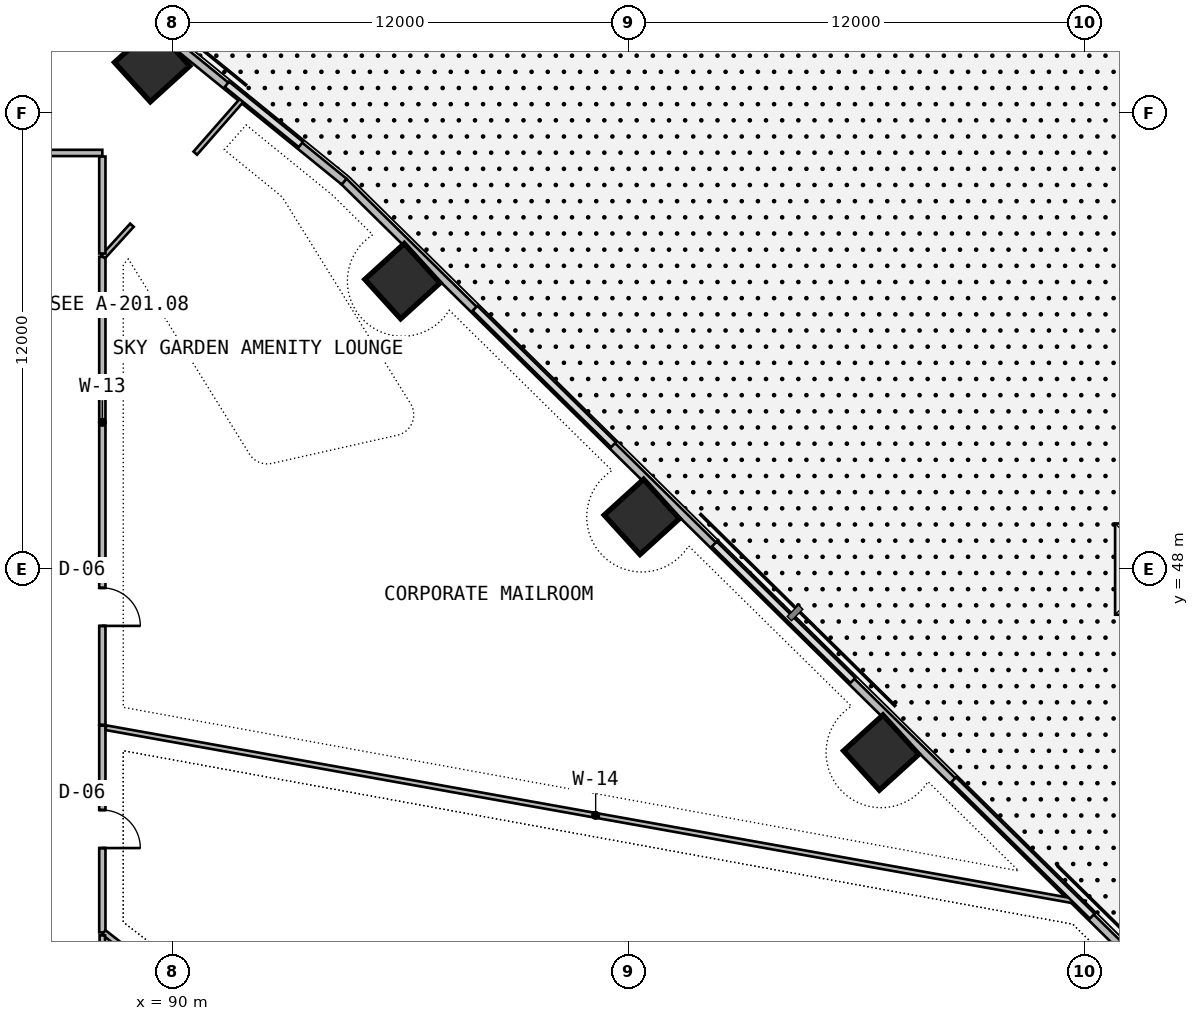
"""IFC4 building model, lengths in metres.
Left out: names, types, materials, properties, quantities, classifications, styles, units other than length and angle.
Written with IfcOpenShell. Run it as: python <this file> out.ifc"""

import sys

from ifc_helpers import new_model, si_unit, direction, frame, frame_2d, origin, origin_2d, place, context, subcontext, project, spatial, rectangle, extrude, element, fill, save


model = new_model("IFC4")
c1 = context("Model", 3, precision=1e-05, world=origin(), true_north=direction((0.0, 1.0)))
c2 = subcontext(c1, "Body", "Model", "MODEL_VIEW")
j1 = project(units=[si_unit("LENGTHUNIT", "METRE"), si_unit("PLANEANGLEUNIT", "RADIAN")], contexts=[c1])
p1 = place(None, origin())
s1 = spatial("IfcSite", under=j1, at=p1, CompositionType="ELEMENT")
p2 = place(p1, origin())
s2 = spatial("IfcBuilding", under=s1, at=p2, CompositionType="ELEMENT")
p3 = place(p2, frame((0.0, 0.0, 26.7)))
s3 = spatial("IfcBuildingStorey", under=s2, at=p3, CompositionType="ELEMENT", Elevation=26.7)
for number, where, z_axis, x_axis in (
    (1, (108.644, 43.172, 0.0), (0.0, 0.0, 1.0), (0.74, 0.672, 0.0)),
    (2, (102.345, 49.374, 0.0), (0.0, 0.0, 1.0), (0.74, 0.672, 0.0)),
    (3, (96.047, 55.576, 0.0), (0.0, 0.0, 1.0), (0.74, 0.672, 0.0)),
    (4, (89.46, 61.285, 0.0), (0.0, 0.0, 1.0), (0.74, 0.672, 0.0)),
):
    element("IfcColumn", number, at=place(p3, frame(where, z_axis=z_axis, x_axis=x_axis)), inside=s3, PredefinedType="COLUMN", context=c2, shape_type="SweptSolid", body=[
        extrude(rectangle(XDim=1.4, YDim=1.4, at=origin_2d()), origin(), (0.0, 0.0, 1.0), 3.6),
    ])
p4 = place(p3, frame((120.254, 32.848, 0.0), z_axis=(0.0, 0.0, 1.0), x_axis=(-0.71254385441, 0.701627576099, 0.0)))
e5 = element("IfcWall", 5, at=p4, inside=s3, PredefinedType="PARAPET", context=c2, shape_type="SweptSolid", body=[
    extrude(rectangle(XDim=36.142, YDim=0.2, at=frame_2d((18.071, 0.0))), origin(), (0.0, 0.0, 1.0), 1.15),
])
p5 = place(p3, frame((94.513, 58.196, 0.0), z_axis=(0.0, 0.0, 1.0), x_axis=(-0.776001602097, 0.630730935933, 0.0)))
e6 = element("IfcWall", 6, at=p5, inside=s3, PredefinedType="PARAPET", context=c2, shape_type="SweptSolid", body=[
    extrude(rectangle(XDim=36.148, YDim=0.2, at=frame_2d((18.074, 0.0))), origin(), (0.0, 0.0, 1.0), 1.15),
])
p6 = place(p3, frame((88.15, 38.439, 0.0), z_axis=(0.0, 0.0, 1.0), x_axis=(0.0, 1.0, 0.0)))
e7 = element("IfcWall", 7, at=p6, inside=s3, PredefinedType="PARTITIONING", context=c2, shape_type="SweptSolid", body=[
    extrude(rectangle(XDim=5.441, YDim=0.165, at=frame_2d((2.72, 0.0))), origin(), (0.0, 0.0, 1.0), 2.785),
])
p7 = place(p6, frame((2.22, 0.0, 0.0)))
e8 = element("IfcOpeningElement", 8, at=p7, cuts=e7, PredefinedType="OPENING", context=c2, shape_type="SweptSolid", body=[
    extrude(rectangle(XDim=1.0, YDim=2.2, at=frame_2d((0.5, 1.1))), frame((0.0, 0.093, 0.0), z_axis=(0.0, -1.0, 0.0), x_axis=(1.0, 0.0, 0.0)), (0.0, 0.0, 1.0), 0.185),
])
p8 = place(p3, frame((97.954, 30.846, 0.0), z_axis=(0.0, 0.0, 1.0), x_axis=(-0.789412787299, 0.613862729972, 0.0)))
e9 = element("IfcWall", 9, at=p8, inside=s3, PredefinedType="PARTITIONING", context=c2, shape_type="SweptSolid", body=[
    extrude(rectangle(XDim=12.37, YDim=0.145, at=frame_2d((6.185, 0.0))), origin(), (0.0, 0.0, 1.0), 2.385),
])
p9 = place(p3, frame((88.244, 43.827, 0.0), z_axis=(0.0, 0.0, 1.0), x_axis=(0.984354244371, -0.176200799059, 0.0)))
e10 = element("IfcWall", 10, at=p9, inside=s3, PredefinedType="PARTITIONING", context=c2, shape_type="SweptSolid", body=[
    extrude(rectangle(XDim=26.183, YDim=0.125, at=frame_2d((13.092, 0.0))), origin(), (0.0, 0.0, 1.0), 2.785),
])
p10 = place(p3, frame((88.15, 32.969, 0.0), z_axis=(0.0, 0.0, 1.0), x_axis=(0.0, 1.0, 0.0)))
e11 = element("IfcWall", 11, at=p10, inside=s3, PredefinedType="PARTITIONING", context=c2, shape_type="SweptSolid", body=[
    extrude(rectangle(XDim=5.394, YDim=0.145, at=frame_2d((2.697, 0.0))), origin(), (0.0, 0.0, 1.0), 2.785),
])
p11 = place(p10, frame((2.247, 0.0, 0.0)))
e12 = element("IfcOpeningElement", 12, at=p11, cuts=e11, PredefinedType="OPENING", context=c2, shape_type="SweptSolid", body=[
    extrude(rectangle(XDim=0.9, YDim=2.1, at=frame_2d((0.45, 1.05))), frame((0.0, 0.083, 0.0), z_axis=(0.0, -1.0, 0.0), x_axis=(1.0, 0.0, 0.0)), (0.0, 0.0, 1.0), 0.165),
])
p12 = place(p3, frame((88.15, 43.905, 0.0), z_axis=(0.0, 0.0, 1.0), x_axis=(0.0, 1.0, 0.0)))
e13 = element("IfcWall", 13, at=p12, inside=s3, PredefinedType="PARTITIONING", context=c2, shape_type="SweptSolid", body=[
    extrude(rectangle(XDim=12.312, YDim=0.165, at=frame_2d((6.156, 0.0))), origin(), (0.0, 0.0, 1.0), 2.785),
])
p13 = place(p12, frame((2.601, 0.0, 0.0)))
e14 = element("IfcOpeningElement", 14, at=p13, cuts=e13, PredefinedType="OPENING", context=c2, shape_type="SweptSolid", body=[
    extrude(rectangle(XDim=1.0, YDim=2.2, at=frame_2d((0.5, 1.1))), frame((0.0, 0.093, 0.0), z_axis=(0.0, -1.0, 0.0), x_axis=(1.0, 0.0, 0.0)), (0.0, 0.0, 1.0), 0.185),
])
p14 = place(p3, frame((90.596, 58.944, 0.0), z_axis=(0.0, 0.0, 1.0), x_axis=(0.659102632296, 0.752053003518, 0.0)))
e15 = element("IfcWall", 15, at=p14, inside=s3, PredefinedType="PARTITIONING", context=c2, shape_type="SweptSolid", body=[
    extrude(rectangle(XDim=2.051, YDim=0.125, at=frame_2d((1.026, 0.0))), origin(), (0.0, 0.0, 1.0), 2.785),
])
p15 = place(p3, frame((88.171, 56.217, 0.0), z_axis=(0.0, 0.0, 1.0), x_axis=(0.673579579933, 0.739114706589, 0.0)))
e16 = element("IfcWall", 16, at=p15, inside=s3, PredefinedType="PARTITIONING", context=c2, shape_type="SweptSolid", body=[
    extrude(rectangle(XDim=1.125, YDim=0.125, at=frame_2d((0.562, 0.0))), origin(), (0.0, 0.0, 1.0), 3.4),
])
p16 = place(p3, frame((88.15, 58.95, 0.0), z_axis=(0.0, 0.0, 1.0), x_axis=(-1.0, 0.0, 0.0)))
e17 = element("IfcWall", 17, at=p16, inside=s3, PredefinedType="PARTITIONING", context=c2, shape_type="SweptSolid", body=[
    extrude(rectangle(XDim=13.6, YDim=0.165, at=frame_2d((6.8, 0.0))), origin(), (0.0, 0.0, 1.0), 2.785),
])
p17 = place(p16, frame((6.3, 0.0, 0.0)))
e18 = element("IfcOpeningElement", 18, at=p17, cuts=e17, PredefinedType="OPENING", context=c2, shape_type="SweptSolid", body=[
    extrude(rectangle(XDim=1.0, YDim=2.2, at=frame_2d((0.5, 1.1))), frame((0.0, 0.093, 0.0), z_axis=(0.0, -1.0, 0.0), x_axis=(1.0, 0.0, 0.0)), (0.0, 0.0, 1.0), 0.185),
])
p18 = place(p3, frame((88.15, 56.304, 0.0), z_axis=(0.0, 0.0, 1.0), x_axis=(0.0, 1.0, 0.0)))
e19 = element("IfcWall", 19, at=p18, inside=s3, PredefinedType="PARTITIONING", context=c2, shape_type="SweptSolid", body=[
    extrude(rectangle(XDim=2.552, YDim=0.165, at=frame_2d((1.276, 0.0))), origin(), (0.0, 0.0, 1.0), 3.4),
])
p19 = place(p3, frame((0.0, 0.0, -0.35)))
p20 = place(p19, frame((116.0, 48.0, -0.01)))
p21 = place(p20, frame((0.0, 0.0, 0.31)))
e20 = element("IfcWindow", 20, at=p21, inside=s3, PartitioningType="SINGLE_PANEL", PredefinedType="SKYLIGHT", context=c2, shape_type="SweptSolid", body=[
    extrude(rectangle(XDim=2.4, YDim=2.4, at=origin_2d()), origin(), (0.0, 0.0, 1.0), 0.05),
])
p22 = place(p7, frame((1.0, 0.0, 0.0), z_axis=(0.0, 0.0, 1.0), x_axis=(-1.0, 0.0, 0.0)))
e21 = element("IfcDoor", 21, at=p22, inside=s3, OperationType="SINGLE_SWING_RIGHT", PredefinedType="DOOR", context=c2, shape_type="SweptSolid", body=[
    extrude(rectangle(XDim=1.0, YDim=2.2, at=frame_2d((0.5, 1.1))), frame((0.0, 0.025, 0.0), z_axis=(0.0, -1.0, 0.0), x_axis=(1.0, 0.0, 0.0)), (0.0, 0.0, 1.0), 0.05),
])
fill(e8, e21)
p23 = place(p13, frame((1.0, 0.0, 0.0), z_axis=(0.0, 0.0, 1.0), x_axis=(-1.0, 0.0, 0.0)))
e22 = element("IfcDoor", 22, at=p23, inside=s3, OperationType="SINGLE_SWING_RIGHT", PredefinedType="DOOR", context=c2, shape_type="SweptSolid", body=[
    extrude(rectangle(XDim=1.0, YDim=2.2, at=frame_2d((0.5, 1.1))), frame((0.0, 0.025, 0.0), z_axis=(0.0, -1.0, 0.0), x_axis=(1.0, 0.0, 0.0)), (0.0, 0.0, 1.0), 0.05),
])
fill(e14, e22)
save(model, sys.argv[1])
